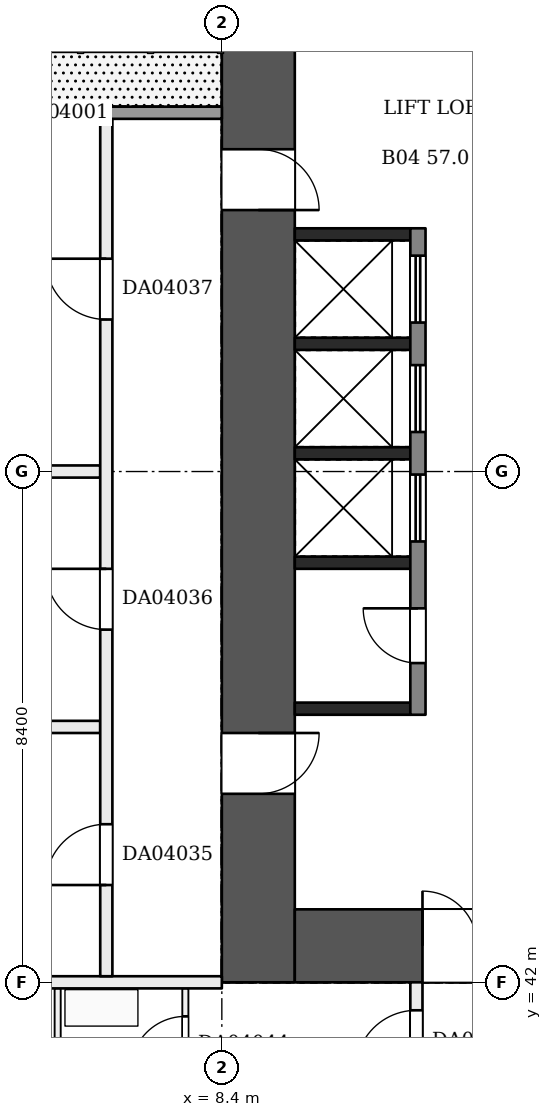
"""IFC4 building model, lengths in metres.
Left out: names, types, materials, properties, quantities, classifications, styles, units other than length and angle.
Written with IfcOpenShell. Run it as: python <this file> out.ifc"""

import sys

from ifc_helpers import new_model, si_unit, direction, frame, frame_2d, origin, place, context, subcontext, project, spatial, rectangle, extrude, element, fill, save


model = new_model("IFC4")
c1 = context("Model", 3, precision=1e-05, world=origin(), true_north=direction((0.0, 1.0)))
c2 = subcontext(c1, "Body", "Model", "MODEL_VIEW")
j1 = project(units=[si_unit("LENGTHUNIT", "METRE"), si_unit("PLANEANGLEUNIT", "RADIAN")], contexts=[c1])
p1 = place(None, origin())
s1 = spatial("IfcSite", under=j1, at=p1, CompositionType="ELEMENT")
p2 = place(p1, origin())
s2 = spatial("IfcBuilding", under=s1, at=p2, CompositionType="ELEMENT")
p3 = place(p2, frame((0.0, 0.0, 25.2)))
s3 = spatial("IfcBuildingStorey", under=s2, at=p3, CompositionType="ELEMENT", Elevation=25.2)
p4 = place(p3, frame((9.0, 58.8, 0.0), z_axis=(0.0, 0.0, 1.0), x_axis=(0.0, -1.0, 0.0)))
e1 = element("IfcWall", 1, at=p4, inside=s3, PredefinedType="SHEAR", context=c2, shape_type="SweptSolid", body=[
    extrude(rectangle(XDim=16.8, YDim=1.2, at=frame_2d((8.4, 0.0))), origin(), (0.0, 0.0, 1.0), 3.22),
])
p5 = place(p4, frame((3.1, 0.0, 0.0)))
e2 = element("IfcOpeningElement", 2, at=p5, cuts=e1, PredefinedType="OPENING", context=c2, shape_type="SweptSolid", body=[
    extrude(rectangle(XDim=1.0, YDim=2.1, at=frame_2d((0.5, 1.05))), frame((0.0, 0.61, 0.0), z_axis=(0.0, -1.0, 0.0), x_axis=(1.0, 0.0, 0.0)), (0.0, 0.0, 1.0), 1.22),
])
p6 = place(p4, frame((12.7, 0.0, 0.0)))
e3 = element("IfcOpeningElement", 3, at=p6, cuts=e1, PredefinedType="OPENING", context=c2, shape_type="SweptSolid", body=[
    extrude(rectangle(XDim=1.0, YDim=2.1, at=frame_2d((0.5, 1.05))), frame((0.0, 0.61, 0.0), z_axis=(0.0, -1.0, 0.0), x_axis=(1.0, 0.0, 0.0)), (0.0, 0.0, 1.0), 1.22),
])
p7 = place(p3, frame((9.6, 42.6, 0.0), z_axis=(0.0, 0.0, 1.0), x_axis=(1.0, 0.0, 0.0)))
e4 = element("IfcWall", 4, at=p7, inside=s3, PredefinedType="SHEAR", context=c2, shape_type="SweptSolid", body=[
    extrude(rectangle(XDim=14.4, YDim=1.2, at=frame_2d((7.2, 0.0))), origin(), (0.0, 0.0, 1.0), 3.22),
])
p8 = place(p7, frame((2.1, 0.0, 0.0)))
e5 = element("IfcOpeningElement", 5, at=p8, cuts=e4, PredefinedType="OPENING", context=c2, shape_type="SweptSolid", body=[
    extrude(rectangle(XDim=1.8, YDim=2.1, at=frame_2d((0.9, 1.05))), frame((0.0, 0.61, 0.0), z_axis=(0.0, -1.0, 0.0), x_axis=(1.0, 0.0, 0.0)), (0.0, 0.0, 1.0), 1.22),
])
for number, where, z_axis, x_axis in (
    (6, (9.6, 54.3, 0.0), (0.0, 0.0, 1.0), (1.0, 0.0, 0.0)),
    (7, (9.6, 52.5, 0.0), (0.0, 0.0, 1.0), (1.0, 0.0, 0.0)),
    (8, (9.6, 50.7, 0.0), (0.0, 0.0, 1.0), (1.0, 0.0, 0.0)),
    (9, (9.6, 48.9, 0.0), (0.0, 0.0, 1.0), (1.0, 0.0, 0.0)),
    (10, (9.6, 46.5, 0.0), (0.0, 0.0, 1.0), (1.0, 0.0, 0.0)),
):
    element("IfcWall", number, at=place(p3, frame(where, z_axis=z_axis, x_axis=x_axis)), inside=s3, PredefinedType="SHEAR", context=c2, shape_type="SweptSolid", body=[
        extrude(rectangle(XDim=1.9, YDim=0.2, at=frame_2d((0.95, 0.0))), origin(), (0.0, 0.0, 1.0), 3.22),
    ])
p9 = place(p3, frame((11.625, 54.4, 0.0), z_axis=(0.0, 0.0, 1.0), x_axis=(0.0, -1.0, 0.0)))
e11 = element("IfcWall", 11, at=p9, inside=s3, PredefinedType="SHEAR", context=c2, shape_type="SweptSolid", body=[
    extrude(rectangle(XDim=8.0, YDim=0.25, at=frame_2d((4.0, 0.0))), origin(), (0.0, 0.0, 1.0), 3.22),
])
p10 = place(p9, frame((0.45, 0.0, 0.0)))
e12 = element("IfcOpeningElement", 12, at=p10, cuts=e11, PredefinedType="OPENING", context=c2, shape_type="SweptSolid", body=[
    extrude(rectangle(XDim=1.1, YDim=2.1, at=frame_2d((0.55, 1.05))), frame((0.0, 0.135, 0.0), z_axis=(0.0, -1.0, 0.0), x_axis=(1.0, 0.0, 0.0)), (0.0, 0.0, 1.0), 0.27),
])
p11 = place(p9, frame((2.25, 0.0, 0.0)))
e13 = element("IfcOpeningElement", 13, at=p11, cuts=e11, PredefinedType="OPENING", context=c2, shape_type="SweptSolid", body=[
    extrude(rectangle(XDim=1.1, YDim=2.1, at=frame_2d((0.55, 1.05))), frame((0.0, 0.135, 0.0), z_axis=(0.0, -1.0, 0.0), x_axis=(1.0, 0.0, 0.0)), (0.0, 0.0, 1.0), 0.27),
])
p12 = place(p9, frame((4.05, 0.0, 0.0)))
e14 = element("IfcOpeningElement", 14, at=p12, cuts=e11, PredefinedType="OPENING", context=c2, shape_type="SweptSolid", body=[
    extrude(rectangle(XDim=1.1, YDim=2.1, at=frame_2d((0.55, 1.05))), frame((0.0, 0.135, 0.0), z_axis=(0.0, -1.0, 0.0), x_axis=(1.0, 0.0, 0.0)), (0.0, 0.0, 1.0), 0.27),
])
p13 = place(p9, frame((6.25, 0.0, 0.0)))
e15 = element("IfcOpeningElement", 15, at=p13, cuts=e11, PredefinedType="OPENING", context=c2, shape_type="SweptSolid", body=[
    extrude(rectangle(XDim=0.9, YDim=2.1, at=frame_2d((0.45, 1.05))), frame((0.0, 0.135, 0.0), z_axis=(0.0, -1.0, 0.0), x_axis=(1.0, 0.0, 0.0)), (0.0, 0.0, 1.0), 0.27),
])
p14 = place(p3, frame((2.5, 42.0, 0.0), z_axis=(0.0, 0.0, 1.0), x_axis=(1.0, 0.0, 0.0)))
e16 = element("IfcWall", 16, at=p14, inside=s3, PredefinedType="PARTITIONING", context=c2, shape_type="SweptSolid", body=[
    extrude(rectangle(XDim=5.9, YDim=0.2, at=frame_2d((2.95, 0.0))), origin(), (0.0, 0.0, 1.0), 3.22),
])
for number, where, z_axis, x_axis in (
    (17, (2.5, 46.2, 0.0), (0.0, 0.0, 1.0), (1.0, 0.0, 0.0)),
    (18, (2.5, 50.4, 0.0), (0.0, 0.0, 1.0), (1.0, 0.0, 0.0)),
):
    element("IfcWall", number, at=place(p3, frame(where, z_axis=z_axis, x_axis=x_axis)), inside=s3, PredefinedType="PARTITIONING", context=c2, shape_type="SweptSolid", body=[
        extrude(rectangle(XDim=3.9, YDim=0.2, at=frame_2d((1.95, 0.0))), origin(), (0.0, 0.0, 1.0), 3.22),
    ])
p15 = place(p3, frame((5.7, 37.9, 0.0), z_axis=(0.0, 0.0, 1.0), x_axis=(0.0, 1.0, 0.0)))
e19 = element("IfcWall", 19, at=p15, inside=s3, PredefinedType="PARTITIONING", context=c2, shape_type="SweptSolid", body=[
    extrude(rectangle(XDim=4.0, YDim=0.1, at=frame_2d((2.0, 0.0))), origin(), (0.0, 0.0, 1.0), 3.22),
])
p16 = place(p15, frame((1.5, 0.0, 0.0)))
e20 = element("IfcOpeningElement", 20, at=p16, cuts=e19, PredefinedType="OPENING", context=c2, shape_type="SweptSolid", body=[
    extrude(rectangle(XDim=0.9, YDim=2.1, at=frame_2d((0.45, 1.05))), frame((0.0, 0.06, 0.0), z_axis=(0.0, -1.0, 0.0), x_axis=(1.0, 0.0, 0.0)), (0.0, 0.0, 1.0), 0.12),
])
p17 = place(p3, frame((6.5, 42.1, 0.0), z_axis=(0.0, 0.0, 1.0), x_axis=(0.0, 1.0, 0.0)))
e21 = element("IfcWall", 21, at=p17, inside=s3, PredefinedType="PARTITIONING", context=c2, shape_type="SweptSolid", body=[
    extrude(rectangle(XDim=14.2, YDim=0.2, at=frame_2d((7.1, 0.0))), origin(), (0.0, 0.0, 1.0), 3.22),
])
p18 = place(p17, frame((1.5, 0.0, 0.0)))
e22 = element("IfcOpeningElement", 22, at=p18, cuts=e21, PredefinedType="OPENING", context=c2, shape_type="SweptSolid", body=[
    extrude(rectangle(XDim=1.0, YDim=2.1, at=frame_2d((0.5, 1.05))), frame((0.0, 0.11, 0.0), z_axis=(0.0, -1.0, 0.0), x_axis=(1.0, 0.0, 0.0)), (0.0, 0.0, 1.0), 0.22),
])
p19 = place(p17, frame((5.7, 0.0, 0.0)))
e23 = element("IfcOpeningElement", 23, at=p19, cuts=e21, PredefinedType="OPENING", context=c2, shape_type="SweptSolid", body=[
    extrude(rectangle(XDim=1.0, YDim=2.1, at=frame_2d((0.5, 1.05))), frame((0.0, 0.11, 0.0), z_axis=(0.0, -1.0, 0.0), x_axis=(1.0, 0.0, 0.0)), (0.0, 0.0, 1.0), 0.22),
])
p20 = place(p17, frame((10.8, 0.0, 0.0)))
e24 = element("IfcOpeningElement", 24, at=p20, cuts=e21, PredefinedType="OPENING", context=c2, shape_type="SweptSolid", body=[
    extrude(rectangle(XDim=1.0, YDim=2.1, at=frame_2d((0.5, 1.05))), frame((0.0, 0.11, 0.0), z_axis=(0.0, -1.0, 0.0), x_axis=(1.0, 0.0, 0.0)), (0.0, 0.0, 1.0), 0.22),
])
p21 = place(p3, frame((7.8, 37.9, 0.0), z_axis=(0.0, 0.0, 1.0), x_axis=(0.0, 1.0, 0.0)))
e25 = element("IfcWall", 25, at=p21, inside=s3, PredefinedType="PARTITIONING", context=c2, shape_type="SweptSolid", body=[
    extrude(rectangle(XDim=4.0, YDim=0.1, at=frame_2d((2.0, 0.0))), origin(), (0.0, 0.0, 1.0), 3.22),
])
p22 = place(p21, frame((2.64, 0.0, 0.0)))
e26 = element("IfcOpeningElement", 26, at=p22, cuts=e25, PredefinedType="OPENING", context=c2, shape_type="SweptSolid", body=[
    extrude(rectangle(XDim=0.9, YDim=2.1, at=frame_2d((0.45, 1.05))), frame((0.0, 0.06, 0.0), z_axis=(0.0, -1.0, 0.0), x_axis=(1.0, 0.0, 0.0)), (0.0, 0.0, 1.0), 0.12),
])
p23 = place(p21, frame((0.6, 0.0, 0.0)))
e27 = element("IfcOpeningElement", 27, at=p23, cuts=e25, PredefinedType="OPENING", context=c2, shape_type="SweptSolid", body=[
    extrude(rectangle(XDim=0.9, YDim=2.1, at=frame_2d((0.45, 1.05))), frame((0.0, 0.06, 0.0), z_axis=(0.0, -1.0, 0.0), x_axis=(1.0, 0.0, 0.0)), (0.0, 0.0, 1.0), 0.12),
])
p24 = place(p3, frame((11.6, 11.7, 0.0), z_axis=(0.0, 0.0, 1.0), x_axis=(0.0, 1.0, 0.0)))
e28 = element("IfcWall", 28, at=p24, inside=s3, PredefinedType="PARTITIONING", context=c2, shape_type="SweptSolid", body=[
    extrude(rectangle(XDim=30.3, YDim=0.2, at=frame_2d((15.15, 0.0))), origin(), (0.0, 0.0, 1.0), 3.22),
])
p25 = place(p24, frame((15.0, 0.0, 0.0)))
e29 = element("IfcOpeningElement", 29, at=p25, cuts=e28, PredefinedType="OPENING", context=c2, shape_type="SweptSolid", body=[
    extrude(rectangle(XDim=1.0, YDim=2.1, at=frame_2d((0.5, 1.05))), frame((0.0, 0.11, 0.0), z_axis=(0.0, -1.0, 0.0), x_axis=(1.0, 0.0, 0.0)), (0.0, 0.0, 1.0), 0.22),
])
p26 = place(p24, frame((18.2, 0.0, 0.0)))
e30 = element("IfcOpeningElement", 30, at=p26, cuts=e28, PredefinedType="OPENING", context=c2, shape_type="SweptSolid", body=[
    extrude(rectangle(XDim=1.0, YDim=2.1, at=frame_2d((0.5, 1.05))), frame((0.0, 0.11, 0.0), z_axis=(0.0, -1.0, 0.0), x_axis=(1.0, 0.0, 0.0)), (0.0, 0.0, 1.0), 0.22),
])
p27 = place(p24, frame((22.4, 0.0, 0.0)))
e31 = element("IfcOpeningElement", 31, at=p27, cuts=e28, PredefinedType="OPENING", context=c2, shape_type="SweptSolid", body=[
    extrude(rectangle(XDim=1.0, YDim=2.1, at=frame_2d((0.5, 1.05))), frame((0.0, 0.11, 0.0), z_axis=(0.0, -1.0, 0.0), x_axis=(1.0, 0.0, 0.0)), (0.0, 0.0, 1.0), 0.22),
])
p28 = place(p24, frame((28.84, 0.0, 0.0)))
e32 = element("IfcOpeningElement", 32, at=p28, cuts=e28, PredefinedType="OPENING", context=c2, shape_type="SweptSolid", body=[
    extrude(rectangle(XDim=1.0, YDim=2.1, at=frame_2d((0.5, 1.05))), frame((0.0, 0.11, 0.0), z_axis=(0.0, -1.0, 0.0), x_axis=(1.0, 0.0, 0.0)), (0.0, 0.0, 1.0), 0.22),
])
p29 = place(p3, frame((8.4, 56.3, 0.0), z_axis=(0.0, 0.0, 1.0), x_axis=(-1.0, 0.0, 0.0)))
e33 = element("IfcWall", 33, at=p29, inside=s3, PredefinedType="SOLIDWALL", context=c2, shape_type="SweptSolid", body=[
    extrude(rectangle(XDim=3.6, YDim=0.2, at=frame_2d((1.8, 0.0))), origin(), (0.0, 0.0, 1.0), 3.22),
])
p30 = place(p29, frame((2.0, 0.0, 0.9)))
e34 = element("IfcOpeningElement", 34, at=p30, cuts=e33, PredefinedType="OPENING", context=c2, shape_type="SweptSolid", body=[
    extrude(rectangle(XDim=1.3, YDim=1.5, at=frame_2d((0.65, 0.75))), frame((0.0, 0.11, 0.0), z_axis=(0.0, -1.0, 0.0), x_axis=(1.0, 0.0, 0.0)), (0.0, 0.0, 1.0), 0.22),
])
p31 = place(p5, origin())
e35 = element("IfcDoor", 35, at=p31, inside=s3, OperationType="SINGLE_SWING_RIGHT", PredefinedType="DOOR", context=c2, shape_type="SweptSolid", body=[
    extrude(rectangle(XDim=1.0, YDim=2.1, at=frame_2d((0.5, 1.05))), frame((0.0, 0.025, 0.0), z_axis=(0.0, -1.0, 0.0), x_axis=(1.0, 0.0, 0.0)), (0.0, 0.0, 1.0), 0.05),
])
fill(e2, e35)
p32 = place(p6, origin())
e36 = element("IfcDoor", 36, at=p32, inside=s3, OperationType="SINGLE_SWING_LEFT", PredefinedType="DOOR", context=c2, shape_type="SweptSolid", body=[
    extrude(rectangle(XDim=1.0, YDim=2.1, at=frame_2d((0.5, 1.05))), frame((0.0, 0.025, 0.0), z_axis=(0.0, -1.0, 0.0), x_axis=(1.0, 0.0, 0.0)), (0.0, 0.0, 1.0), 0.05),
])
fill(e3, e36)
p33 = place(p8, origin())
e37 = element("IfcDoor", 37, at=p33, inside=s3, OperationType="DOUBLE_DOOR_SINGLE_SWING", PredefinedType="DOOR", context=c2, shape_type="SweptSolid", body=[
    extrude(rectangle(XDim=1.8, YDim=2.1, at=frame_2d((0.9, 1.05))), frame((0.0, 0.025, 0.0), z_axis=(0.0, -1.0, 0.0), x_axis=(1.0, 0.0, 0.0)), (0.0, 0.0, 1.0), 0.05),
])
fill(e5, e37)
p34 = place(p10, origin())
e38 = element("IfcDoor", 38, at=p34, inside=s3, OperationType="DOUBLE_DOOR_SLIDING", PredefinedType="DOOR", context=c2, shape_type="SweptSolid", body=[
    extrude(rectangle(XDim=1.1, YDim=2.1, at=frame_2d((0.55, 1.05))), frame((0.0, 0.025, 0.0), z_axis=(0.0, -1.0, 0.0), x_axis=(1.0, 0.0, 0.0)), (0.0, 0.0, 1.0), 0.05),
])
fill(e12, e38)
p35 = place(p11, origin())
e39 = element("IfcDoor", 39, at=p35, inside=s3, OperationType="DOUBLE_DOOR_SLIDING", PredefinedType="DOOR", context=c2, shape_type="SweptSolid", body=[
    extrude(rectangle(XDim=1.1, YDim=2.1, at=frame_2d((0.55, 1.05))), frame((0.0, 0.025, 0.0), z_axis=(0.0, -1.0, 0.0), x_axis=(1.0, 0.0, 0.0)), (0.0, 0.0, 1.0), 0.05),
])
fill(e13, e39)
p36 = place(p12, origin())
e40 = element("IfcDoor", 40, at=p36, inside=s3, OperationType="DOUBLE_DOOR_SLIDING", PredefinedType="DOOR", context=c2, shape_type="SweptSolid", body=[
    extrude(rectangle(XDim=1.1, YDim=2.1, at=frame_2d((0.55, 1.05))), frame((0.0, 0.025, 0.0), z_axis=(0.0, -1.0, 0.0), x_axis=(1.0, 0.0, 0.0)), (0.0, 0.0, 1.0), 0.05),
])
fill(e14, e40)
p37 = place(p13, frame((0.9, 0.0, 0.0), z_axis=(0.0, 0.0, 1.0), x_axis=(-1.0, 0.0, 0.0)))
e41 = element("IfcDoor", 41, at=p37, inside=s3, OperationType="SINGLE_SWING_RIGHT", PredefinedType="DOOR", context=c2, shape_type="SweptSolid", body=[
    extrude(rectangle(XDim=0.9, YDim=2.1, at=frame_2d((0.45, 1.05))), frame((0.0, 0.025, 0.0), z_axis=(0.0, -1.0, 0.0), x_axis=(1.0, 0.0, 0.0)), (0.0, 0.0, 1.0), 0.05),
])
fill(e15, e41)
p38 = place(p18, origin())
e42 = element("IfcDoor", 42, at=p38, inside=s3, OperationType="SINGLE_SWING_LEFT", PredefinedType="DOOR", context=c2, shape_type="SweptSolid", body=[
    extrude(rectangle(XDim=1.0, YDim=2.1, at=frame_2d((0.5, 1.05))), frame((0.0, 0.025, 0.0), z_axis=(0.0, -1.0, 0.0), x_axis=(1.0, 0.0, 0.0)), (0.0, 0.0, 1.0), 0.05),
])
fill(e22, e42)
p39 = place(p19, origin())
e43 = element("IfcDoor", 43, at=p39, inside=s3, OperationType="SINGLE_SWING_RIGHT", PredefinedType="DOOR", context=c2, shape_type="SweptSolid", body=[
    extrude(rectangle(XDim=1.0, YDim=2.1, at=frame_2d((0.5, 1.05))), frame((0.0, 0.025, 0.0), z_axis=(0.0, -1.0, 0.0), x_axis=(1.0, 0.0, 0.0)), (0.0, 0.0, 1.0), 0.05),
])
fill(e23, e43)
p40 = place(p20, origin())
e44 = element("IfcDoor", 44, at=p40, inside=s3, OperationType="SINGLE_SWING_RIGHT", PredefinedType="DOOR", context=c2, shape_type="SweptSolid", body=[
    extrude(rectangle(XDim=1.0, YDim=2.1, at=frame_2d((0.5, 1.05))), frame((0.0, 0.025, 0.0), z_axis=(0.0, -1.0, 0.0), x_axis=(1.0, 0.0, 0.0)), (0.0, 0.0, 1.0), 0.05),
])
fill(e24, e44)
p41 = place(p22, origin())
e45 = element("IfcDoor", 45, at=p41, inside=s3, OperationType="SINGLE_SWING_LEFT", PredefinedType="DOOR", context=c2, shape_type="SweptSolid", body=[
    extrude(rectangle(XDim=0.9, YDim=2.1, at=frame_2d((0.45, 1.05))), frame((0.0, 0.025, 0.0), z_axis=(0.0, -1.0, 0.0), x_axis=(1.0, 0.0, 0.0)), (0.0, 0.0, 1.0), 0.05),
])
fill(e26, e45)
p42 = place(p28, origin())
e46 = element("IfcDoor", 46, at=p42, inside=s3, OperationType="SINGLE_SWING_LEFT", PredefinedType="DOOR", context=c2, shape_type="SweptSolid", body=[
    extrude(rectangle(XDim=1.0, YDim=2.1, at=frame_2d((0.5, 1.05))), frame((0.0, 0.025, 0.0), z_axis=(0.0, -1.0, 0.0), x_axis=(1.0, 0.0, 0.0)), (0.0, 0.0, 1.0), 0.05),
])
fill(e32, e46)
p43 = place(p30, origin())
e47 = element("IfcWindow", 47, at=p43, inside=s3, PartitioningType="SINGLE_PANEL", PredefinedType="WINDOW", context=c2, shape_type="SweptSolid", body=[
    extrude(rectangle(XDim=1.3, YDim=1.5, at=frame_2d((0.65, 0.75))), frame((0.0, 0.03, 0.0), z_axis=(0.0, -1.0, 0.0), x_axis=(1.0, 0.0, 0.0)), (0.0, 0.0, 1.0), 0.06),
])
fill(e34, e47)
save(model, sys.argv[1])
